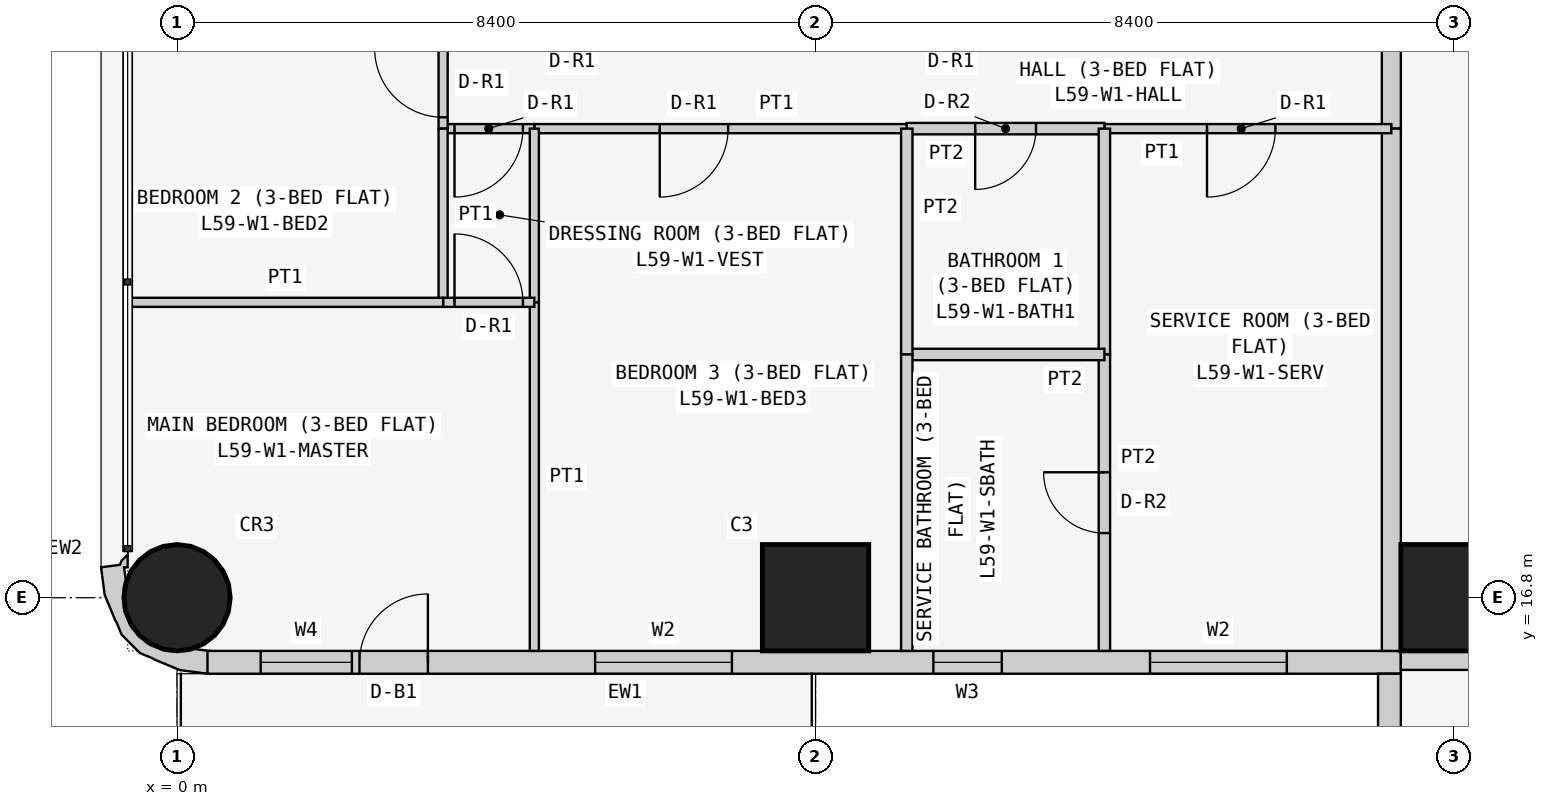
"""IFC4 building model, lengths in metres.
Left out: names, types, materials, properties, quantities, classifications, styles, units other than length and angle.
Written with IfcOpenShell. Run it as: python <this file> out.ifc"""

import sys

from ifc_helpers import new_model, si_unit, direction, frame, frame_2d, origin, origin_2d, place, context, subcontext, project, spatial, polyline, rectangle, circle, outline, extrude, element, fill, save


model = new_model("IFC4")
c1 = context("Model", 3, precision=1e-05, world=origin(), true_north=direction((0.0, 1.0)))
c2 = subcontext(c1, "Body", "Model", "MODEL_VIEW")
j1 = project(units=[si_unit("LENGTHUNIT", "METRE"), si_unit("PLANEANGLEUNIT", "RADIAN")], contexts=[c1])
p1 = place(None, origin())
s1 = spatial("IfcSite", under=j1, at=p1, CompositionType="ELEMENT")
p2 = place(p1, origin())
s2 = spatial("IfcBuilding", under=s1, at=p2, CompositionType="ELEMENT")
p3 = place(p2, frame((0.0, 0.0, 226.5)))
s3 = spatial("IfcBuildingStorey", under=s2, at=p3, CompositionType="ELEMENT", Elevation=226.5)
p4 = place(p3, frame((0.0, 16.8, 0.0), z_axis=(0.0, 0.0, 1.0), x_axis=(1.0, 0.0, 0.0)))
e1 = element("IfcColumn", 1, at=p4, inside=s3, PredefinedType="COLUMN", context=c2, shape_type="SweptSolid", body=[
    extrude(circle(Radius=0.7, at=origin_2d()), origin(), (0.0, 0.0, 1.0), 3.6),
])
for number, where, z_axis, x_axis in (
    (2, (8.4, 16.8, 0.0), (0.0, 0.0, 1.0), (1.0, 0.0, 0.0)),
    (3, (16.8, 16.8, 0.0), (0.0, 0.0, 1.0), (1.0, 0.0, 0.0)),
):
    element("IfcColumn", number, at=place(p3, frame(where, z_axis=z_axis, x_axis=x_axis)), inside=s3, PredefinedType="COLUMN", context=c2, shape_type="SweptSolid", body=[
        extrude(rectangle(XDim=1.4, YDim=1.4, at=origin_2d()), origin(), (0.0, 0.0, 1.0), 3.6),
    ])
p5 = place(p3, frame((0.4, 15.95, 0.0), z_axis=(0.0, 0.0, 1.0), x_axis=(1.0, 0.0, 0.0)))
e4 = element("IfcWall", 4, at=p5, inside=s3, PredefinedType="SOLIDWALL", context=c2, shape_type="SweptSolid", body=[
    extrude(rectangle(XDim=15.7, YDim=0.3, at=frame_2d((7.85, 0.0))), origin(), (0.0, 0.0, 1.0), 3.45),
])
p6 = place(p5, frame((12.4, 0.0, 0.9)))
e5 = element("IfcOpeningElement", 5, at=p6, cuts=e4, PredefinedType="OPENING", context=c2, shape_type="SweptSolid", body=[
    extrude(rectangle(XDim=1.8, YDim=1.5, at=frame_2d((0.9, 0.75))), frame((0.0, 0.16, 0.0), z_axis=(0.0, -1.0, 0.0), x_axis=(1.0, 0.0, 0.0)), (0.0, 0.0, 1.0), 0.32),
])
p7 = place(p5, frame((9.55, 0.0, 1.5)))
e6 = element("IfcOpeningElement", 6, at=p7, cuts=e4, PredefinedType="OPENING", context=c2, shape_type="SweptSolid", body=[
    extrude(rectangle(XDim=0.9, YDim=0.7, at=frame_2d((0.45, 0.35))), frame((0.0, 0.16, 0.0), z_axis=(0.0, -1.0, 0.0), x_axis=(1.0, 0.0, 0.0)), (0.0, 0.0, 1.0), 0.32),
])
p8 = place(p5, frame((5.1, 0.0, 0.9)))
e7 = element("IfcOpeningElement", 7, at=p8, cuts=e4, PredefinedType="OPENING", context=c2, shape_type="SweptSolid", body=[
    extrude(rectangle(XDim=1.8, YDim=1.5, at=frame_2d((0.9, 0.75))), frame((0.0, 0.16, 0.0), z_axis=(0.0, -1.0, 0.0), x_axis=(1.0, 0.0, 0.0)), (0.0, 0.0, 1.0), 0.32),
])
p9 = place(p5, frame((2.0, 0.0, 0.0)))
e8 = element("IfcOpeningElement", 8, at=p9, cuts=e4, PredefinedType="OPENING", context=c2, shape_type="SweptSolid", body=[
    extrude(rectangle(XDim=0.9, YDim=2.4, at=frame_2d((0.45, 1.2))), frame((0.0, 0.16, 0.0), z_axis=(0.0, -1.0, 0.0), x_axis=(1.0, 0.0, 0.0)), (0.0, 0.0, 1.0), 0.32),
])
p10 = place(p5, frame((0.7, 0.0, 0.9)))
e9 = element("IfcOpeningElement", 9, at=p10, cuts=e4, PredefinedType="OPENING", context=c2, shape_type="SweptSolid", body=[
    extrude(rectangle(XDim=1.2, YDim=1.5, at=frame_2d((0.6, 0.75))), frame((0.0, 0.16, 0.0), z_axis=(0.0, -1.0, 0.0), x_axis=(1.0, 0.0, 0.0)), (0.0, 0.0, 1.0), 0.32),
])
p11 = place(p3, frame((15.95, 15.8, 0.0), z_axis=(0.0, 0.0, 1.0), x_axis=(0.0, -1.0, 0.0)))
e10 = element("IfcWall", 10, at=p11, inside=s3, PredefinedType="SOLIDWALL", context=c2, shape_type="SweptSolid", body=[
    extrude(rectangle(XDim=7.0, YDim=0.3, at=frame_2d((3.5, 0.0))), origin(), (0.0, 0.0, 1.0), 3.45),
])
p12 = place(p11, frame((1.5, 0.0, 0.9)))
e11 = element("IfcOpeningElement", 11, at=p12, cuts=e10, PredefinedType="OPENING", context=c2, shape_type="SweptSolid", body=[
    extrude(rectangle(XDim=2.4, YDim=1.5, at=frame_2d((1.2, 0.75))), frame((0.0, 0.16, 0.0), z_axis=(0.0, -1.0, 0.0), x_axis=(1.0, 0.0, 0.0)), (0.0, 0.0, 1.0), 0.32),
])
p13 = place(p11, frame((5.05, 0.0, 0.9)))
e12 = element("IfcOpeningElement", 12, at=p13, cuts=e10, PredefinedType="OPENING", context=c2, shape_type="SweptSolid", body=[
    extrude(rectangle(XDim=1.2, YDim=1.5, at=frame_2d((0.6, 0.75))), frame((0.0, 0.16, 0.0), z_axis=(0.0, -1.0, 0.0), x_axis=(1.0, 0.0, 0.0)), (0.0, 0.0, 1.0), 0.32),
])
p14 = place(p3, frame((-0.588, 17.312, 0.0), z_axis=(0.0, 0.0, 1.0), x_axis=(-0.898030234854, -0.439933741929, 0.0)))
e13 = element("IfcWall", 13, at=p14, inside=s3, PredefinedType="SOLIDWALL", context=c2, shape_type="SweptSolid", body=[
    extrude(outline(polyline([(-0.222, 1.793), (-0.39, 1.541), (-0.372, 1.532), (-0.195, 1.415), (-0.12, 1.41), (0.131, 1.287), (0.315, 1.078), (0.406, 0.814), (0.388, 0.536), (0.265, 0.285), (0.209, 0.236), (0.148, 0.053), (0.105, 0.074), (0.032, -0.076), (0.138, -0.039), (0.182, -0.0), (0.419, -0.08), (0.536, 0.266), (0.559, 0.631), (0.555, 0.651), (0.566, 0.836), (0.456, 1.159), (0.333, 1.298), (0.324, 1.316), (0.082, 1.591), (-0.222, 1.793)])), origin(), (0.0, 0.0, 1.0), 3.45),
])
p15 = place(p3, frame((22.971, 15.975, 0.0), z_axis=(0.0, 0.0, 1.0), x_axis=(-1.0, 0.0, 0.0)))
e14 = element("IfcWall", 14, at=p15, inside=s3, PredefinedType="PARTITIONING", context=c2, shape_type="SweptSolid", body=[
    extrude(rectangle(XDim=6.871, YDim=0.25, at=frame_2d((3.436, 0.0))), origin(), (0.0, 0.0, 1.0), 3.45),
])
p16 = place(p3, frame((15.975, 22.971, 0.0), z_axis=(0.0, 0.0, 1.0), x_axis=(0.0, 1.0, 0.0)))
e15 = element("IfcWall", 15, at=p16, inside=s3, PredefinedType="PARTITIONING", context=c2, shape_type="SweptSolid", body=[
    extrude(rectangle(XDim=1.2, YDim=0.25, at=frame_2d((0.6, 0.0))), origin(), (0.0, 0.0, 1.0), 3.45),
])
p17 = place(p3, frame((15.975, 16.1, 0.0), z_axis=(0.0, 0.0, 1.0), x_axis=(0.0, 1.0, 0.0)))
e16 = element("IfcWall", 16, at=p17, inside=s3, PredefinedType="PARTITIONING", context=c2, shape_type="SweptSolid", body=[
    extrude(rectangle(XDim=6.871, YDim=0.25, at=frame_2d((3.436, 0.0))), origin(), (0.0, 0.0, 1.0), 3.45),
])
p18 = place(p3, frame((12.2, 22.971, 0.0), z_axis=(0.0, 0.0, 1.0), x_axis=(1.0, 0.0, 0.0)))
e17 = element("IfcWall", 17, at=p18, inside=s3, PredefinedType="PARTITIONING", context=c2, shape_type="SweptSolid", body=[
    extrude(rectangle(XDim=3.775, YDim=0.12, at=frame_2d((1.888, 0.0))), origin(), (0.0, 0.0, 1.0), 3.45),
])
p19 = place(p18, frame((1.35, 0.0, 0.0)))
e18 = element("IfcOpeningElement", 18, at=p19, cuts=e17, PredefinedType="OPENING", context=c2, shape_type="SweptSolid", body=[
    extrude(rectangle(XDim=0.9, YDim=2.1, at=frame_2d((0.45, 1.05))), frame((0.0, 0.07, 0.0), z_axis=(0.0, -1.0, 0.0), x_axis=(1.0, 0.0, 0.0)), (0.0, 0.0, 1.0), 0.14),
])
p20 = place(p3, frame((9.6, 22.971, 0.0), z_axis=(0.0, 0.0, 1.0), x_axis=(1.0, 0.0, 0.0)))
e19 = element("IfcWall", 19, at=p20, inside=s3, PredefinedType="PARTITIONING", context=c2, shape_type="SweptSolid", body=[
    extrude(rectangle(XDim=2.6, YDim=0.15, at=frame_2d((1.3, 0.0))), origin(), (0.0, 0.0, 1.0), 3.45),
])
p21 = place(p20, frame((0.9, 0.0, 0.0)))
e20 = element("IfcOpeningElement", 20, at=p21, cuts=e19, PredefinedType="OPENING", context=c2, shape_type="SweptSolid", body=[
    extrude(rectangle(XDim=0.8, YDim=2.1, at=frame_2d((0.4, 1.05))), frame((0.0, 0.085, 0.0), z_axis=(0.0, -1.0, 0.0), x_axis=(1.0, 0.0, 0.0)), (0.0, 0.0, 1.0), 0.17),
])
p22 = place(p3, frame((4.7, 22.971, 0.0), z_axis=(0.0, 0.0, 1.0), x_axis=(1.0, 0.0, 0.0)))
e21 = element("IfcWall", 21, at=p22, inside=s3, PredefinedType="PARTITIONING", context=c2, shape_type="SweptSolid", body=[
    extrude(rectangle(XDim=4.9, YDim=0.12, at=frame_2d((2.45, 0.0))), origin(), (0.0, 0.0, 1.0), 3.45),
])
p23 = place(p22, frame((1.65, 0.0, 0.0)))
e22 = element("IfcOpeningElement", 22, at=p23, cuts=e21, PredefinedType="OPENING", context=c2, shape_type="SweptSolid", body=[
    extrude(rectangle(XDim=0.9, YDim=2.1, at=frame_2d((0.45, 1.05))), frame((0.0, 0.07, 0.0), z_axis=(0.0, -1.0, 0.0), x_axis=(1.0, 0.0, 0.0)), (0.0, 0.0, 1.0), 0.14),
])
p24 = place(p3, frame((3.5, 22.971, 0.0), z_axis=(0.0, 0.0, 1.0), x_axis=(1.0, 0.0, 0.0)))
e23 = element("IfcWall", 23, at=p24, inside=s3, PredefinedType="PARTITIONING", context=c2, shape_type="SweptSolid", body=[
    extrude(rectangle(XDim=1.2, YDim=0.12, at=frame_2d((0.6, 0.0))), origin(), (0.0, 0.0, 1.0), 3.45),
])
p25 = place(p24, frame((0.15, 0.0, 0.0)))
e24 = element("IfcOpeningElement", 24, at=p25, cuts=e23, PredefinedType="OPENING", context=c2, shape_type="SweptSolid", body=[
    extrude(rectangle(XDim=0.9, YDim=2.1, at=frame_2d((0.45, 1.05))), frame((0.0, 0.07, 0.0), z_axis=(0.0, -1.0, 0.0), x_axis=(1.0, 0.0, 0.0)), (0.0, 0.0, 1.0), 0.14),
])
p26 = place(p3, frame((3.5, 24.171, 0.0), z_axis=(0.0, 0.0, 1.0), x_axis=(0.0, -1.0, 0.0)))
e25 = element("IfcWall", 25, at=p26, inside=s3, PredefinedType="PARTITIONING", context=c2, shape_type="SweptSolid", body=[
    extrude(rectangle(XDim=1.2, YDim=0.12, at=frame_2d((0.6, 0.0))), origin(), (0.0, 0.0, 1.0), 3.45),
])
p27 = place(p26, frame((0.151, 0.0, 0.0)))
e26 = element("IfcOpeningElement", 26, at=p27, cuts=e25, PredefinedType="OPENING", context=c2, shape_type="SweptSolid", body=[
    extrude(rectangle(XDim=0.9, YDim=2.1, at=frame_2d((0.45, 1.05))), frame((0.0, 0.07, 0.0), z_axis=(0.0, -1.0, 0.0), x_axis=(1.0, 0.0, 0.0)), (0.0, 0.0, 1.0), 0.14),
])
p28 = place(p3, frame((12.2, 22.971, 0.0), z_axis=(0.0, 0.0, 1.0), x_axis=(0.0, -1.0, 0.0)))
e27 = element("IfcWall", 27, at=p28, inside=s3, PredefinedType="PARTITIONING", context=c2, shape_type="SweptSolid", body=[
    extrude(rectangle(XDim=2.971, YDim=0.15, at=frame_2d((1.485, 0.0))), origin(), (0.0, 0.0, 1.0), 3.45),
])
p29 = place(p3, frame((12.2, 20.0, 0.0), z_axis=(0.0, 0.0, 1.0), x_axis=(0.0, -1.0, 0.0)))
e28 = element("IfcWall", 28, at=p29, inside=s3, PredefinedType="PARTITIONING", context=c2, shape_type="SweptSolid", body=[
    extrude(rectangle(XDim=3.9, YDim=0.15, at=frame_2d((1.95, 0.0))), origin(), (0.0, 0.0, 1.0), 3.45),
])
p30 = place(p29, frame((1.55, 0.0, 0.0)))
e29 = element("IfcOpeningElement", 29, at=p30, cuts=e28, PredefinedType="OPENING", context=c2, shape_type="SweptSolid", body=[
    extrude(rectangle(XDim=0.8, YDim=2.1, at=frame_2d((0.4, 1.05))), frame((0.0, 0.085, 0.0), z_axis=(0.0, -1.0, 0.0), x_axis=(1.0, 0.0, 0.0)), (0.0, 0.0, 1.0), 0.17),
])
p31 = place(p3, frame((9.6, 20.0, 0.0), z_axis=(0.0, 0.0, 1.0), x_axis=(1.0, 0.0, 0.0)))
e30 = element("IfcWall", 30, at=p31, inside=s3, PredefinedType="PARTITIONING", context=c2, shape_type="SweptSolid", body=[
    extrude(rectangle(XDim=2.6, YDim=0.15, at=frame_2d((1.3, 0.0))), origin(), (0.0, 0.0, 1.0), 3.45),
])
p32 = place(p3, frame((9.6, 22.971, 0.0), z_axis=(0.0, 0.0, 1.0), x_axis=(0.0, -1.0, 0.0)))
e31 = element("IfcWall", 31, at=p32, inside=s3, PredefinedType="PARTITIONING", context=c2, shape_type="SweptSolid", body=[
    extrude(rectangle(XDim=2.971, YDim=0.15, at=frame_2d((1.485, 0.0))), origin(), (0.0, 0.0, 1.0), 3.45),
])
p33 = place(p3, frame((9.6, 20.0, 0.0), z_axis=(0.0, 0.0, 1.0), x_axis=(0.0, -1.0, 0.0)))
e32 = element("IfcWall", 32, at=p33, inside=s3, PredefinedType="PARTITIONING", context=c2, shape_type="SweptSolid", body=[
    extrude(rectangle(XDim=3.9, YDim=0.15, at=frame_2d((1.95, 0.0))), origin(), (0.0, 0.0, 1.0), 3.45),
])
p34 = place(p3, frame((4.7, 22.971, 0.0), z_axis=(0.0, 0.0, 1.0), x_axis=(0.0, -1.0, 0.0)))
e33 = element("IfcWall", 33, at=p34, inside=s3, PredefinedType="PARTITIONING", context=c2, shape_type="SweptSolid", body=[
    extrude(rectangle(XDim=2.285, YDim=0.12, at=frame_2d((1.143, 0.0))), origin(), (0.0, 0.0, 1.0), 3.45),
])
p35 = place(p3, frame((4.7, 20.686, 0.0), z_axis=(0.0, 0.0, 1.0), x_axis=(0.0, -1.0, 0.0)))
e34 = element("IfcWall", 34, at=p35, inside=s3, PredefinedType="PARTITIONING", context=c2, shape_type="SweptSolid", body=[
    extrude(rectangle(XDim=4.586, YDim=0.12, at=frame_2d((2.293, 0.0))), origin(), (0.0, 0.0, 1.0), 3.45),
])
p36 = place(p3, frame((3.5, 22.971, 0.0), z_axis=(0.0, 0.0, 1.0), x_axis=(0.0, -1.0, 0.0)))
e35 = element("IfcWall", 35, at=p36, inside=s3, PredefinedType="PARTITIONING", context=c2, shape_type="SweptSolid", body=[
    extrude(rectangle(XDim=2.285, YDim=0.12, at=frame_2d((1.143, 0.0))), origin(), (0.0, 0.0, 1.0), 3.45),
])
p37 = place(p3, frame((3.5, 20.686, 0.0), z_axis=(0.0, 0.0, 1.0), x_axis=(1.0, 0.0, 0.0)))
e36 = element("IfcWall", 36, at=p37, inside=s3, PredefinedType="PARTITIONING", context=c2, shape_type="SweptSolid", body=[
    extrude(rectangle(XDim=1.2, YDim=0.12, at=frame_2d((0.6, 0.0))), origin(), (0.0, 0.0, 1.0), 3.45),
])
p38 = place(p37, frame((0.15, 0.0, 0.0)))
e37 = element("IfcOpeningElement", 37, at=p38, cuts=e36, PredefinedType="OPENING", context=c2, shape_type="SweptSolid", body=[
    extrude(rectangle(XDim=0.9, YDim=2.1, at=frame_2d((0.45, 1.05))), frame((0.0, 0.07, 0.0), z_axis=(0.0, -1.0, 0.0), x_axis=(1.0, 0.0, 0.0)), (0.0, 0.0, 1.0), 0.14),
])
p39 = place(p3, frame((-0.65, 20.686, 0.0), z_axis=(0.0, 0.0, 1.0), x_axis=(1.0, 0.0, 0.0)))
e38 = element("IfcWall", 38, at=p39, inside=s3, PredefinedType="PARTITIONING", context=c2, shape_type="SweptSolid", body=[
    extrude(rectangle(XDim=4.15, YDim=0.12, at=frame_2d((2.075, 0.0))), origin(), (0.0, 0.0, 1.0), 3.45),
])
p40 = place(p6, origin())
e39 = element("IfcWindow", 39, at=p40, inside=s3, PartitioningType="SINGLE_PANEL", PredefinedType="WINDOW", context=c2, shape_type="SweptSolid", body=[
    extrude(rectangle(XDim=1.8, YDim=1.5, at=frame_2d((0.9, 0.75))), frame((0.0, 0.03, 0.0), z_axis=(0.0, -1.0, 0.0), x_axis=(1.0, 0.0, 0.0)), (0.0, 0.0, 1.0), 0.06),
])
fill(e5, e39)
p41 = place(p7, origin())
e40 = element("IfcWindow", 40, at=p41, inside=s3, PartitioningType="SINGLE_PANEL", PredefinedType="WINDOW", context=c2, shape_type="SweptSolid", body=[
    extrude(rectangle(XDim=0.9, YDim=0.7, at=frame_2d((0.45, 0.35))), frame((0.0, 0.03, 0.0), z_axis=(0.0, -1.0, 0.0), x_axis=(1.0, 0.0, 0.0)), (0.0, 0.0, 1.0), 0.06),
])
fill(e6, e40)
p42 = place(p8, origin())
e41 = element("IfcWindow", 41, at=p42, inside=s3, PartitioningType="SINGLE_PANEL", PredefinedType="WINDOW", context=c2, shape_type="SweptSolid", body=[
    extrude(rectangle(XDim=1.8, YDim=1.5, at=frame_2d((0.9, 0.75))), frame((0.0, 0.03, 0.0), z_axis=(0.0, -1.0, 0.0), x_axis=(1.0, 0.0, 0.0)), (0.0, 0.0, 1.0), 0.06),
])
fill(e7, e41)
p43 = place(p9, origin())
e42 = element("IfcDoor", 42, at=p43, inside=s3, OperationType="SINGLE_SWING_RIGHT", PredefinedType="DOOR", context=c2, shape_type="SweptSolid", body=[
    extrude(rectangle(XDim=0.9, YDim=2.4, at=frame_2d((0.45, 1.2))), frame((0.0, 0.025, 0.0), z_axis=(0.0, -1.0, 0.0), x_axis=(1.0, 0.0, 0.0)), (0.0, 0.0, 1.0), 0.05),
])
fill(e8, e42)
p44 = place(p10, origin())
e43 = element("IfcWindow", 43, at=p44, inside=s3, PartitioningType="SINGLE_PANEL", PredefinedType="WINDOW", context=c2, shape_type="SweptSolid", body=[
    extrude(rectangle(XDim=1.2, YDim=1.5, at=frame_2d((0.6, 0.75))), frame((0.0, 0.03, 0.0), z_axis=(0.0, -1.0, 0.0), x_axis=(1.0, 0.0, 0.0)), (0.0, 0.0, 1.0), 0.06),
])
fill(e9, e43)
p45 = place(p19, frame((0.9, 0.0, 0.0), z_axis=(0.0, 0.0, 1.0), x_axis=(-1.0, 0.0, 0.0)))
e44 = element("IfcDoor", 44, at=p45, inside=s3, OperationType="SINGLE_SWING_RIGHT", PredefinedType="DOOR", context=c2, shape_type="SweptSolid", body=[
    extrude(rectangle(XDim=0.9, YDim=2.1, at=frame_2d((0.45, 1.05))), frame((0.0, 0.025, 0.0), z_axis=(0.0, -1.0, 0.0), x_axis=(1.0, 0.0, 0.0)), (0.0, 0.0, 1.0), 0.05),
])
fill(e18, e44)
p46 = place(p30, frame((0.8, 0.0, 0.0), z_axis=(0.0, 0.0, 1.0), x_axis=(-1.0, 0.0, 0.0)))
e45 = element("IfcDoor", 45, at=p46, inside=s3, OperationType="SINGLE_SWING_RIGHT", PredefinedType="DOOR", context=c2, shape_type="SweptSolid", body=[
    extrude(rectangle(XDim=0.8, YDim=2.1, at=frame_2d((0.4, 1.05))), frame((0.0, 0.025, 0.0), z_axis=(0.0, -1.0, 0.0), x_axis=(1.0, 0.0, 0.0)), (0.0, 0.0, 1.0), 0.05),
])
fill(e29, e45)
p47 = place(p21, frame((0.8, 0.0, 0.0), z_axis=(0.0, 0.0, 1.0), x_axis=(-1.0, 0.0, 0.0)))
e46 = element("IfcDoor", 46, at=p47, inside=s3, OperationType="SINGLE_SWING_RIGHT", PredefinedType="DOOR", context=c2, shape_type="SweptSolid", body=[
    extrude(rectangle(XDim=0.8, YDim=2.1, at=frame_2d((0.4, 1.05))), frame((0.0, 0.025, 0.0), z_axis=(0.0, -1.0, 0.0), x_axis=(1.0, 0.0, 0.0)), (0.0, 0.0, 1.0), 0.05),
])
fill(e20, e46)
p48 = place(p23, frame((0.9, 0.0, 0.0), z_axis=(0.0, 0.0, 1.0), x_axis=(-1.0, 0.0, 0.0)))
e47 = element("IfcDoor", 47, at=p48, inside=s3, OperationType="SINGLE_SWING_RIGHT", PredefinedType="DOOR", context=c2, shape_type="SweptSolid", body=[
    extrude(rectangle(XDim=0.9, YDim=2.1, at=frame_2d((0.45, 1.05))), frame((0.0, 0.025, 0.0), z_axis=(0.0, -1.0, 0.0), x_axis=(1.0, 0.0, 0.0)), (0.0, 0.0, 1.0), 0.05),
])
fill(e22, e47)
p49 = place(p25, frame((0.9, 0.0, 0.0), z_axis=(0.0, 0.0, 1.0), x_axis=(-1.0, 0.0, 0.0)))
e48 = element("IfcDoor", 48, at=p49, inside=s3, OperationType="SINGLE_SWING_RIGHT", PredefinedType="DOOR", context=c2, shape_type="SweptSolid", body=[
    extrude(rectangle(XDim=0.9, YDim=2.1, at=frame_2d((0.45, 1.05))), frame((0.0, 0.025, 0.0), z_axis=(0.0, -1.0, 0.0), x_axis=(1.0, 0.0, 0.0)), (0.0, 0.0, 1.0), 0.05),
])
fill(e24, e48)
p50 = place(p38, origin())
e49 = element("IfcDoor", 49, at=p50, inside=s3, OperationType="SINGLE_SWING_LEFT", PredefinedType="DOOR", context=c2, shape_type="SweptSolid", body=[
    extrude(rectangle(XDim=0.9, YDim=2.1, at=frame_2d((0.45, 1.05))), frame((0.0, 0.025, 0.0), z_axis=(0.0, -1.0, 0.0), x_axis=(1.0, 0.0, 0.0)), (0.0, 0.0, 1.0), 0.05),
])
fill(e37, e49)
p51 = place(p27, frame((0.9, 0.0, 0.0), z_axis=(0.0, 0.0, 1.0), x_axis=(-1.0, 0.0, 0.0)))
e50 = element("IfcDoor", 50, at=p51, inside=s3, OperationType="SINGLE_SWING_RIGHT", PredefinedType="DOOR", context=c2, shape_type="SweptSolid", body=[
    extrude(rectangle(XDim=0.9, YDim=2.1, at=frame_2d((0.45, 1.05))), frame((0.0, 0.025, 0.0), z_axis=(0.0, -1.0, 0.0), x_axis=(1.0, 0.0, 0.0)), (0.0, 0.0, 1.0), 0.05),
])
fill(e26, e50)
save(model, sys.argv[1])
